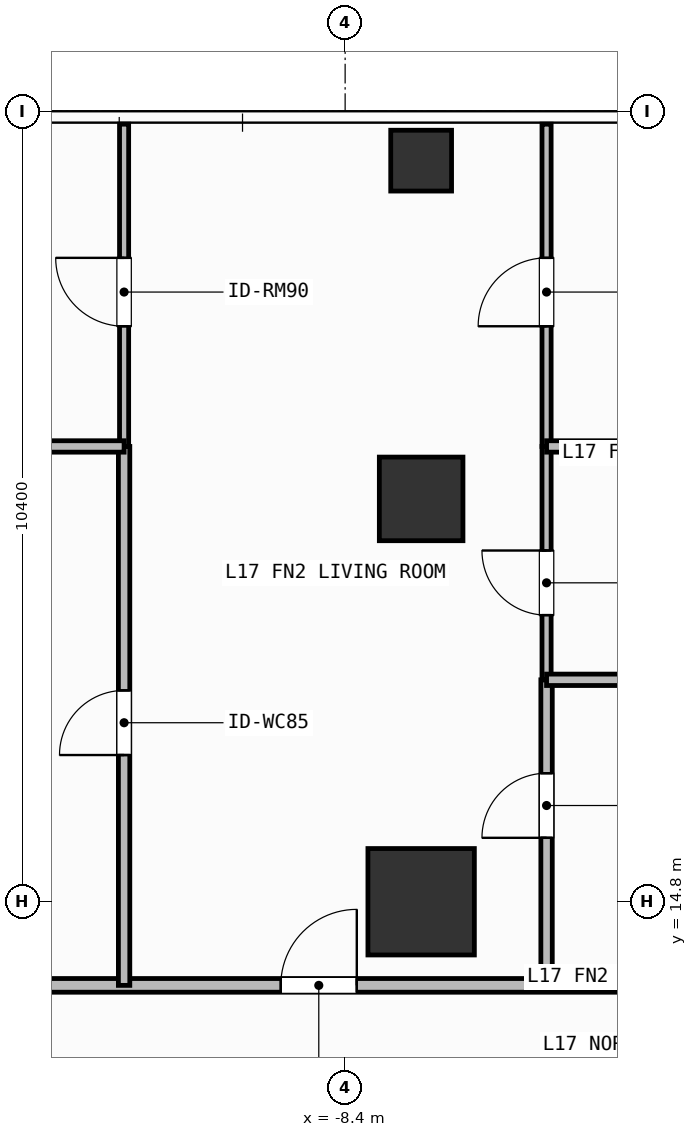
"""IFC4 building model, lengths in metres.
Left out: names, types, materials, properties, quantities, classifications, styles, units other than length and angle.
Written with IfcOpenShell. Run it as: python <this file> out.ifc"""

import sys

from ifc_helpers import new_model, si_unit, direction, frame, frame_2d, origin, origin_2d, place, context, subcontext, project, spatial, rectangle, hollow_rectangle, extrude, element, fill, save


model = new_model("IFC4")
c1 = context("Model", 3, precision=1e-05, world=origin(), true_north=direction((0.0, 1.0)))
c2 = subcontext(c1, "Body", "Model", "MODEL_VIEW")
j1 = project(units=[si_unit("LENGTHUNIT", "METRE"), si_unit("PLANEANGLEUNIT", "RADIAN")], contexts=[c1])
p1 = place(None, origin())
s1 = spatial("IfcSite", under=j1, at=p1, CompositionType="ELEMENT")
p2 = place(p1, origin())
s2 = spatial("IfcBuilding", under=s1, at=p2, CompositionType="ELEMENT")
p3 = place(p2, frame((0.0, 0.0, 65.7)))
s3 = spatial("IfcBuildingStorey", under=s2, at=p3, CompositionType="ELEMENT", Elevation=65.7)
p4 = place(p3, frame((-7.4, 14.8, 0.0), z_axis=(0.0, 0.0, 1.0), x_axis=(1.0, 0.0, 0.0)))
e1 = element("IfcColumn", 1, at=p4, inside=s3, PredefinedType="COLUMN", context=c2, shape_type="SweptSolid", body=[
    extrude(rectangle(XDim=1.4, YDim=1.4, at=origin_2d()), origin(), (0.0, 0.0, 1.0), 3.9),
])
p5 = place(p3, frame((-7.4, 20.1, 0.0), z_axis=(0.0, 0.0, 1.0), x_axis=(1.0, 0.0, 0.0)))
e2 = element("IfcColumn", 2, at=p5, inside=s3, PredefinedType="COLUMN", context=c2, shape_type="SweptSolid", body=[
    extrude(rectangle(XDim=1.1, YDim=1.1, at=origin_2d()), origin(), (0.0, 0.0, 1.0), 3.9),
])
p6 = place(p3, frame((-7.4, 24.55, 0.0), z_axis=(0.0, 0.0, 1.0), x_axis=(1.0, 0.0, 0.0)))
e3 = element("IfcColumn", 3, at=p6, inside=s3, PredefinedType="COLUMN", context=c2, shape_type="SweptSolid", body=[
    extrude(hollow_rectangle(XDim=0.8, YDim=0.8, WallThickness=0.036, at=origin_2d()), origin(), (0.0, 0.0, 1.0), 3.9),
])
p7 = place(p3, frame((-14.951, 13.7, 0.0), z_axis=(0.0, 0.0, 1.0), x_axis=(1.0, 0.0, 0.0)))
e4 = element("IfcWall", 4, at=p7, inside=s3, PredefinedType="PARTITIONING", context=c2, shape_type="SweptSolid", body=[
    extrude(rectangle(XDim=12.051, YDim=0.18, at=frame_2d((6.025, 0.0))), origin(), (0.0, 0.0, 1.0), 3.68),
])
p8 = place(p7, frame((5.704, 0.0, 0.0)))
e5 = element("IfcOpeningElement", 5, at=p8, cuts=e4, PredefinedType="OPENING", context=c2, shape_type="SweptSolid", body=[
    extrude(rectangle(XDim=1.0, YDim=2.2, at=frame_2d((0.5, 1.1))), frame((0.0, 0.1, 0.0), z_axis=(0.0, -1.0, 0.0), x_axis=(1.0, 0.0, 0.0)), (0.0, 0.0, 1.0), 0.2),
])
p9 = place(p3, frame((-11.308, 13.7, 0.0), z_axis=(0.0, 0.0, 1.0), x_axis=(0.0, 1.0, 0.0)))
e6 = element("IfcWall", 6, at=p9, inside=s3, PredefinedType="PARTITIONING", context=c2, shape_type="SweptSolid", body=[
    extrude(rectangle(XDim=7.09, YDim=0.15, at=frame_2d((3.545, 0.0))), origin(), (0.0, 0.0, 1.0), 3.37),
])
p10 = place(p9, frame((3.03, 0.0, 0.0)))
e7 = element("IfcOpeningElement", 7, at=p10, cuts=e6, PredefinedType="OPENING", context=c2, shape_type="SweptSolid", body=[
    extrude(rectangle(XDim=0.85, YDim=2.1, at=frame_2d((0.425, 1.05))), frame((0.0, 0.085, 0.0), z_axis=(0.0, -1.0, 0.0), x_axis=(1.0, 0.0, 0.0)), (0.0, 0.0, 1.0), 0.17),
])
p11 = place(p3, frame((-11.308, 20.79, 0.0), z_axis=(0.0, 0.0, 1.0), x_axis=(0.0, 1.0, 0.0)))
e8 = element("IfcWall", 8, at=p11, inside=s3, PredefinedType="PARTITIONING", context=c2, shape_type="SweptSolid", body=[
    extrude(rectangle(XDim=4.24, YDim=0.12, at=frame_2d((2.12, 0.0))), origin(), (0.0, 0.0, 1.0), 3.37),
])
p12 = place(p11, frame((1.581, 0.0, 0.0)))
e9 = element("IfcOpeningElement", 9, at=p12, cuts=e8, PredefinedType="OPENING", context=c2, shape_type="SweptSolid", body=[
    extrude(rectangle(XDim=0.9, YDim=2.1, at=frame_2d((0.45, 1.05))), frame((0.0, 0.07, 0.0), z_axis=(0.0, -1.0, 0.0), x_axis=(1.0, 0.0, 0.0)), (0.0, 0.0, 1.0), 0.14),
])
p13 = place(p3, frame((-5.75, 13.7, 0.0), z_axis=(0.0, 0.0, 1.0), x_axis=(0.0, 1.0, 0.0)))
e10 = element("IfcWall", 10, at=p13, inside=s3, PredefinedType="PARTITIONING", context=c2, shape_type="SweptSolid", body=[
    extrude(rectangle(XDim=4.02, YDim=0.15, at=frame_2d((2.01, 0.0))), origin(), (0.0, 0.0, 1.0), 3.68),
])
p14 = place(p13, frame((1.941, 0.0, 0.0)))
e11 = element("IfcOpeningElement", 11, at=p14, cuts=e10, PredefinedType="OPENING", context=c2, shape_type="SweptSolid", body=[
    extrude(rectangle(XDim=0.85, YDim=2.1, at=frame_2d((0.425, 1.05))), frame((0.0, 0.085, 0.0), z_axis=(0.0, -1.0, 0.0), x_axis=(1.0, 0.0, 0.0)), (0.0, 0.0, 1.0), 0.17),
])
p15 = place(p3, frame((-5.75, 17.72, 0.0), z_axis=(0.0, 0.0, 1.0), x_axis=(0.0, 1.0, 0.0)))
e12 = element("IfcWall", 12, at=p15, inside=s3, PredefinedType="PARTITIONING", context=c2, shape_type="SweptSolid", body=[
    extrude(rectangle(XDim=3.07, YDim=0.12, at=frame_2d((1.535, 0.0))), origin(), (0.0, 0.0, 1.0), 3.68),
])
p16 = place(p15, frame((0.851, 0.0, 0.0)))
e13 = element("IfcOpeningElement", 13, at=p16, cuts=e12, PredefinedType="OPENING", context=c2, shape_type="SweptSolid", body=[
    extrude(rectangle(XDim=0.85, YDim=2.1, at=frame_2d((0.425, 1.05))), frame((0.0, 0.07, 0.0), z_axis=(0.0, -1.0, 0.0), x_axis=(1.0, 0.0, 0.0)), (0.0, 0.0, 1.0), 0.14),
])
p17 = place(p3, frame((-5.75, 20.79, 0.0), z_axis=(0.0, 0.0, 1.0), x_axis=(0.0, 1.0, 0.0)))
e14 = element("IfcWall", 14, at=p17, inside=s3, PredefinedType="PARTITIONING", context=c2, shape_type="SweptSolid", body=[
    extrude(rectangle(XDim=4.24, YDim=0.12, at=frame_2d((2.12, 0.0))), origin(), (0.0, 0.0, 1.0), 3.68),
])
p18 = place(p17, frame((1.581, 0.0, 0.0)))
e15 = element("IfcOpeningElement", 15, at=p18, cuts=e14, PredefinedType="OPENING", context=c2, shape_type="SweptSolid", body=[
    extrude(rectangle(XDim=0.9, YDim=2.1, at=frame_2d((0.45, 1.05))), frame((0.0, 0.07, 0.0), z_axis=(0.0, -1.0, 0.0), x_axis=(1.0, 0.0, 0.0)), (0.0, 0.0, 1.0), 0.14),
])
p19 = place(p3, frame((-14.951, 20.79, 0.0), z_axis=(0.0, 0.0, 1.0), x_axis=(1.0, 0.0, 0.0)))
e16 = element("IfcWall", 16, at=p19, inside=s3, PredefinedType="PARTITIONING", context=c2, shape_type="SweptSolid", body=[
    extrude(rectangle(XDim=3.643, YDim=0.15, at=frame_2d((1.821, 0.0))), origin(), (0.0, 0.0, 1.0), 3.68),
])
for number, where, z_axis, x_axis in (
    (17, (-5.75, 17.72, 0.0), (0.0, 0.0, 1.0), (1.0, 0.0, 0.0)),
    (18, (-5.75, 20.79, 0.0), (0.0, 0.0, 1.0), (1.0, 0.0, 0.0)),
):
    element("IfcWall", number, at=place(p3, frame(where, z_axis=z_axis, x_axis=x_axis)), inside=s3, PredefinedType="PARTITIONING", context=c2, shape_type="SweptSolid", body=[
        extrude(rectangle(XDim=2.85, YDim=0.15, at=frame_2d((1.425, 0.0))), origin(), (0.0, 0.0, 1.0), 3.68),
    ])
p20 = place(p8, origin())
e19 = element("IfcDoor", 19, at=p20, inside=s3, OperationType="SINGLE_SWING_RIGHT", PredefinedType="DOOR", context=c2, shape_type="SweptSolid", body=[
    extrude(rectangle(XDim=1.0, YDim=2.2, at=frame_2d((0.5, 1.1))), frame((0.0, 0.025, 0.0), z_axis=(0.0, -1.0, 0.0), x_axis=(1.0, 0.0, 0.0)), (0.0, 0.0, 1.0), 0.05),
])
fill(e5, e19)
p21 = place(p10, origin())
e20 = element("IfcDoor", 20, at=p21, inside=s3, OperationType="SINGLE_SWING_LEFT", PredefinedType="DOOR", context=c2, shape_type="SweptSolid", body=[
    extrude(rectangle(XDim=0.85, YDim=2.1, at=frame_2d((0.425, 1.05))), frame((0.0, 0.025, 0.0), z_axis=(0.0, -1.0, 0.0), x_axis=(1.0, 0.0, 0.0)), (0.0, 0.0, 1.0), 0.05),
])
fill(e7, e20)
p22 = place(p12, origin())
e21 = element("IfcDoor", 21, at=p22, inside=s3, OperationType="SINGLE_SWING_RIGHT", PredefinedType="DOOR", context=c2, shape_type="SweptSolid", body=[
    extrude(rectangle(XDim=0.9, YDim=2.1, at=frame_2d((0.45, 1.05))), frame((0.0, 0.025, 0.0), z_axis=(0.0, -1.0, 0.0), x_axis=(1.0, 0.0, 0.0)), (0.0, 0.0, 1.0), 0.05),
])
fill(e9, e21)
p23 = place(p14, origin())
e22 = element("IfcDoor", 22, at=p23, inside=s3, OperationType="SINGLE_SWING_LEFT", PredefinedType="DOOR", context=c2, shape_type="SweptSolid", body=[
    extrude(rectangle(XDim=0.85, YDim=2.1, at=frame_2d((0.425, 1.05))), frame((0.0, 0.025, 0.0), z_axis=(0.0, -1.0, 0.0), x_axis=(1.0, 0.0, 0.0)), (0.0, 0.0, 1.0), 0.05),
])
fill(e11, e22)
p24 = place(p16, origin())
e23 = element("IfcDoor", 23, at=p24, inside=s3, OperationType="SINGLE_SWING_RIGHT", PredefinedType="DOOR", context=c2, shape_type="SweptSolid", body=[
    extrude(rectangle(XDim=0.85, YDim=2.1, at=frame_2d((0.425, 1.05))), frame((0.0, 0.025, 0.0), z_axis=(0.0, -1.0, 0.0), x_axis=(1.0, 0.0, 0.0)), (0.0, 0.0, 1.0), 0.05),
])
fill(e13, e23)
p25 = place(p18, origin())
e24 = element("IfcDoor", 24, at=p25, inside=s3, OperationType="SINGLE_SWING_LEFT", PredefinedType="DOOR", context=c2, shape_type="SweptSolid", body=[
    extrude(rectangle(XDim=0.9, YDim=2.1, at=frame_2d((0.45, 1.05))), frame((0.0, 0.025, 0.0), z_axis=(0.0, -1.0, 0.0), x_axis=(1.0, 0.0, 0.0)), (0.0, 0.0, 1.0), 0.05),
])
fill(e15, e24)
save(model, sys.argv[1])
